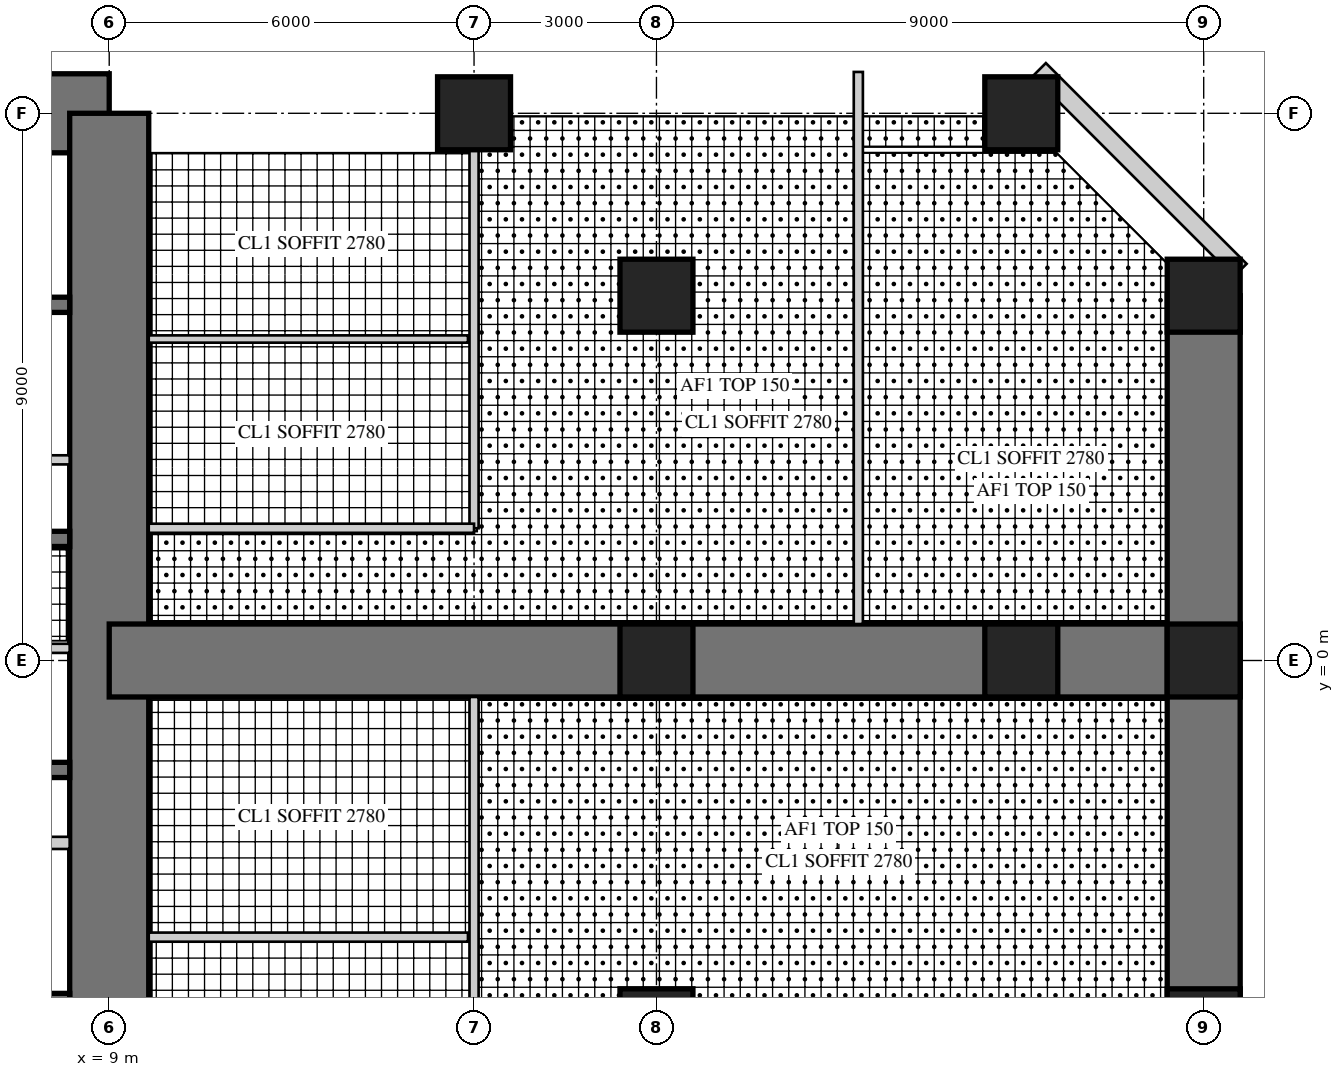
"""IFC4 building model, lengths in metres.
Left out: names, types, materials, properties, quantities, classifications, styles, units other than length and angle.
Written with IfcOpenShell. Run it as: python <this file> out.ifc"""

import sys

from ifc_helpers import new_model, si_unit, direction, frame, frame_2d, origin, origin_2d, place, context, subcontext, project, spatial, rectangle, hollow_rectangle, extrude, element, fill, save


model = new_model("IFC4")
c1 = context("Model", 3, precision=1e-05, world=origin(), true_north=direction((0.0, 1.0)))
c2 = subcontext(c1, "Body", "Model", "MODEL_VIEW")
j1 = project(units=[si_unit("LENGTHUNIT", "METRE"), si_unit("PLANEANGLEUNIT", "RADIAN")], contexts=[c1])
p1 = place(None, origin())
s1 = spatial("IfcSite", under=j1, at=p1, CompositionType="ELEMENT")
p2 = place(p1, origin())
s2 = spatial("IfcBuilding", under=s1, at=p2, CompositionType="ELEMENT")
p3 = place(p2, frame((0.0, 0.0, 79.5)))
s3 = spatial("IfcBuildingStorey", under=s2, at=p3, CompositionType="ELEMENT", Elevation=79.5)
p4 = place(p3, frame((9.0, 9.0, 0.0), z_axis=(0.0, 0.0, 1.0), x_axis=(-1.0, 0.0, 0.0)))
e1 = element("IfcWall", 1, at=p4, inside=s3, PredefinedType="SHEAR", context=c2, shape_type="SweptSolid", body=[
    extrude(rectangle(XDim=18.0, YDim=1.3, at=frame_2d((9.0, 0.0))), origin(), (0.0, 0.0, 1.0), 4.0),
])
p5 = place(p4, frame((9.8, 0.0, 0.0)))
e2 = element("IfcOpeningElement", 2, at=p5, cuts=e1, PredefinedType="OPENING", context=c2, shape_type="SweptSolid", body=[
    extrude(rectangle(XDim=1.0, YDim=2.4, at=frame_2d((0.5, 1.2))), frame((0.0, 0.66, 0.0), z_axis=(0.0, -1.0, 0.0), x_axis=(1.0, 0.0, 0.0)), (0.0, 0.0, 1.0), 1.32),
])
p6 = place(p3, frame((9.0, -9.0, 0.0), z_axis=(0.0, 0.0, 1.0), x_axis=(0.0, 1.0, 0.0)))
e3 = element("IfcWall", 3, at=p6, inside=s3, PredefinedType="SHEAR", context=c2, shape_type="SweptSolid", body=[
    extrude(rectangle(XDim=18.0, YDim=1.3, at=frame_2d((9.0, 0.0))), origin(), (0.0, 0.0, 1.0), 4.0),
])
p7 = place(p6, frame((9.8, 0.0, 0.0)))
e4 = element("IfcOpeningElement", 4, at=p7, cuts=e3, PredefinedType="OPENING", context=c2, shape_type="SweptSolid", body=[
    extrude(rectangle(XDim=1.0, YDim=2.4, at=frame_2d((0.5, 1.2))), frame((0.0, 0.66, 0.0), z_axis=(0.0, -1.0, 0.0), x_axis=(1.0, 0.0, 0.0)), (0.0, 0.0, 1.0), 1.32),
])
p8 = place(p3, frame((1.925, 2.0, 0.0), z_axis=(0.0, 0.0, 1.0), x_axis=(1.0, 0.0, 0.0)))
e5 = element("IfcWall", 5, at=p8, inside=s3, PredefinedType="SHEAR", context=c2, shape_type="SweptSolid", body=[
    extrude(rectangle(XDim=6.425, YDim=0.25, at=frame_2d((3.212, 0.0))), origin(), (0.0, 0.0, 1.0), 4.0),
])
p9 = place(p3, frame((1.925, 5.85, 0.0), z_axis=(0.0, 0.0, 1.0), x_axis=(1.0, 0.0, 0.0)))
e6 = element("IfcWall", 6, at=p9, inside=s3, PredefinedType="SHEAR", context=c2, shape_type="SweptSolid", body=[
    extrude(rectangle(XDim=6.425, YDim=0.25, at=frame_2d((3.212, 0.0))), origin(), (0.0, 0.0, 1.0), 4.0),
])
p10 = place(p9, frame((0.454, 0.0, 0.0)))
e7 = element("IfcOpeningElement", 7, at=p10, cuts=e6, PredefinedType="OPENING", context=c2, shape_type="SweptSolid", body=[
    extrude(rectangle(XDim=1.1, YDim=2.2, at=frame_2d((0.55, 1.1))), frame((0.0, 0.135, 0.0), z_axis=(0.0, -1.0, 0.0), x_axis=(1.0, 0.0, 0.0)), (0.0, 0.0, 1.0), 0.27),
])
p11 = place(p9, frame((2.663, 0.0, 0.0)))
e8 = element("IfcOpeningElement", 8, at=p11, cuts=e6, PredefinedType="OPENING", context=c2, shape_type="SweptSolid", body=[
    extrude(rectangle(XDim=1.1, YDim=2.2, at=frame_2d((0.55, 1.1))), frame((0.0, 0.135, 0.0), z_axis=(0.0, -1.0, 0.0), x_axis=(1.0, 0.0, 0.0)), (0.0, 0.0, 1.0), 0.27),
])
p12 = place(p9, frame((4.871, 0.0, 0.0)))
e9 = element("IfcOpeningElement", 9, at=p12, cuts=e6, PredefinedType="OPENING", context=c2, shape_type="SweptSolid", body=[
    extrude(rectangle(XDim=1.1, YDim=2.2, at=frame_2d((0.55, 1.1))), frame((0.0, 0.135, 0.0), z_axis=(0.0, -1.0, 0.0), x_axis=(1.0, 0.0, 0.0)), (0.0, 0.0, 1.0), 0.27),
])
p13 = place(p3, frame((1.925, 3.3, 0.0), z_axis=(0.0, 0.0, 1.0), x_axis=(1.0, 0.0, 0.0)))
e10 = element("IfcWall", 10, at=p13, inside=s3, PredefinedType="PARTITIONING", context=c2, shape_type="SweptSolid", body=[
    extrude(rectangle(XDim=6.425, YDim=0.15, at=frame_2d((3.212, 0.0))), origin(), (0.0, 0.0, 1.0), 4.0),
])
p14 = place(p13, frame((0.075, 0.0, 0.0)))
e11 = element("IfcOpeningElement", 11, at=p14, cuts=e10, PredefinedType="OPENING", context=c2, shape_type="SweptSolid", body=[
    extrude(rectangle(XDim=0.8, YDim=2.1, at=frame_2d((0.4, 1.05))), frame((0.0, 0.085, 0.0), z_axis=(0.0, -1.0, 0.0), x_axis=(1.0, 0.0, 0.0)), (0.0, 0.0, 1.0), 0.17),
])
p15 = place(p13, frame((3.675, 0.0, 0.0)))
e12 = element("IfcOpeningElement", 12, at=p15, cuts=e10, PredefinedType="OPENING", context=c2, shape_type="SweptSolid", body=[
    extrude(rectangle(XDim=0.8, YDim=2.1, at=frame_2d((0.4, 1.05))), frame((0.0, 0.085, 0.0), z_axis=(0.0, -1.0, 0.0), x_axis=(1.0, 0.0, 0.0)), (0.0, 0.0, 1.0), 0.17),
])
p16 = place(p3, frame((2.125, -1.8, 0.0), z_axis=(0.0, 0.0, 1.0), x_axis=(1.0, 0.0, 0.0)))
e13 = element("IfcWall", 13, at=p16, inside=s3, PredefinedType="SHEAR", context=c2, shape_type="SweptSolid", body=[
    extrude(rectangle(XDim=6.225, YDim=0.25, at=frame_2d((3.113, 0.0))), origin(), (0.0, 0.0, 1.0), 4.0),
])
p17 = place(p3, frame((2.125, -5.6, 0.0), z_axis=(0.0, 0.0, 1.0), x_axis=(1.0, 0.0, 0.0)))
e14 = element("IfcWall", 14, at=p17, inside=s3, PredefinedType="SHEAR", context=c2, shape_type="SweptSolid", body=[
    extrude(rectangle(XDim=6.225, YDim=0.25, at=frame_2d((3.113, 0.0))), origin(), (0.0, 0.0, 1.0), 4.0),
])
p18 = place(p17, frame((0.175, 0.0, 0.0)))
e15 = element("IfcOpeningElement", 15, at=p18, cuts=e14, PredefinedType="OPENING", context=c2, shape_type="SweptSolid", body=[
    extrude(rectangle(XDim=1.0, YDim=2.1, at=frame_2d((0.5, 1.05))), frame((0.0, 0.135, 0.0), z_axis=(0.0, -1.0, 0.0), x_axis=(1.0, 0.0, 0.0)), (0.0, 0.0, 1.0), 0.27),
])
p19 = place(p3, frame((5.725, -3.0, 0.0), z_axis=(0.0, 0.0, 1.0), x_axis=(1.0, 0.0, 0.0)))
e16 = element("IfcWall", 16, at=p19, inside=s3, PredefinedType="PARTITIONING", context=c2, shape_type="SweptSolid", body=[
    extrude(rectangle(XDim=2.625, YDim=0.2, at=frame_2d((1.312, 0.0))), origin(), (0.0, 0.0, 1.0), 4.0),
])
p20 = place(p3, frame((9.0, 0.0, 0.0), z_axis=(0.0, 0.0, 1.0), x_axis=(1.0, 0.0, 0.0)))
e17 = element("IfcWall", 17, at=p20, inside=s3, PredefinedType="SHEAR", context=c2, shape_type="SweptSolid", body=[
    extrude(rectangle(XDim=18.0, YDim=1.2, at=frame_2d((9.0, 0.0))), origin(), (0.0, 0.0, 1.0), 4.0),
])
p21 = place(p20, frame((9.9, 0.0, 0.0)))
e18 = element("IfcOpeningElement", 18, at=p21, cuts=e17, PredefinedType="OPENING", context=c2, shape_type="SweptSolid", body=[
    extrude(rectangle(XDim=1.0, YDim=2.2, at=frame_2d((0.5, 1.1))), frame((0.0, 0.61, 0.0), z_axis=(0.0, -1.0, 0.0), x_axis=(1.0, 0.0, 0.0)), (0.0, 0.0, 1.0), 1.22),
])
p22 = place(p3, frame((27.0, -6.0, 0.0), z_axis=(0.0, 0.0, 1.0), x_axis=(0.0, 1.0, 0.0)))
e19 = element("IfcWall", 19, at=p22, inside=s3, PredefinedType="SHEAR", context=c2, shape_type="SweptSolid", body=[
    extrude(rectangle(XDim=12.0, YDim=1.2, at=frame_2d((6.0, 0.0))), origin(), (0.0, 0.0, 1.0), 4.0),
])
p23 = place(p22, frame((1.6, 0.0, 0.6)))
e20 = element("IfcOpeningElement", 20, at=p23, cuts=e19, PredefinedType="OPENING", context=c2, shape_type="SweptSolid", body=[
    extrude(rectangle(XDim=3.0, YDim=2.4, at=frame_2d((1.5, 1.2))), frame((0.0, 0.61, 0.0), z_axis=(0.0, -1.0, 0.0), x_axis=(1.0, 0.0, 0.0)), (0.0, 0.0, 1.0), 1.22),
])
p24 = place(p22, frame((7.4, 0.0, 0.6)))
e21 = element("IfcOpeningElement", 21, at=p24, cuts=e19, PredefinedType="OPENING", context=c2, shape_type="SweptSolid", body=[
    extrude(rectangle(XDim=3.0, YDim=2.4, at=frame_2d((1.5, 1.2))), frame((0.0, 0.61, 0.0), z_axis=(0.0, -1.0, 0.0), x_axis=(1.0, 0.0, 0.0)), (0.0, 0.0, 1.0), 1.22),
])
for number, where, z_axis, x_axis in (
    (22, (15.0, 9.0, 0.0), (0.0, 0.0, 1.0), (1.0, 0.0, 0.0)),
    (23, (24.0, 9.0, 0.0), (0.0, 0.0, 1.0), (1.0, 0.0, 0.0)),
    (24, (27.0, -6.0, 0.0), (0.0, 0.0, 1.0), (1.0, 0.0, 0.0)),
    (25, (27.0, 0.0, 0.0), (0.0, 0.0, 1.0), (1.0, 0.0, 0.0)),
    (26, (27.0, 6.0, 0.0), (0.0, 0.0, 1.0), (1.0, 0.0, 0.0)),
    (27, (18.0, -6.0, 0.0), (0.0, 0.0, 1.0), (1.0, 0.0, 0.0)),
    (28, (18.0, 0.0, 0.0), (0.0, 0.0, 1.0), (1.0, 0.0, 0.0)),
    (29, (18.0, 6.0, 0.0), (0.0, 0.0, 1.0), (1.0, 0.0, 0.0)),
    (30, (24.0, 0.0, 0.0), (0.0, 0.0, 1.0), (1.0, 0.0, 0.0)),
):
    element("IfcColumn", number, at=place(p3, frame(where, z_axis=z_axis, x_axis=x_axis)), inside=s3, PredefinedType="COLUMN", context=c2, shape_type="SweptSolid", body=[
        extrude(rectangle(XDim=1.2, YDim=1.2, at=origin_2d()), origin(), (0.0, 0.0, 1.0), 4.0),
    ])
p25 = place(p3, frame((27.6, 6.418, 0.0), z_axis=(0.0, 0.0, 1.0), x_axis=(-0.707106781187, 0.707106781187, 0.0)))
e31 = element("IfcWall", 31, at=p25, inside=s3, PredefinedType="SOLIDWALL", context=c2, shape_type="SweptSolid", body=[
    extrude(rectangle(XDim=4.669, YDim=0.3, at=frame_2d((2.335, 0.0))), origin(), (0.0, 0.0, 1.0), 3.8),
])
p26 = place(p25, frame((1.885, 0.0, 0.3)))
e32 = element("IfcOpeningElement", 32, at=p26, cuts=e31, PredefinedType="OPENING", context=c2, shape_type="SweptSolid", body=[
    extrude(rectangle(XDim=0.9, YDim=2.4, at=frame_2d((0.45, 1.2))), frame((0.0, 0.16, 0.0), z_axis=(0.0, -1.0, 0.0), x_axis=(1.0, 0.0, 0.0)), (0.0, 0.0, 1.0), 0.32),
])
p27 = place(p3, frame((2.325, 0.2, 0.0), z_axis=(0.0, 0.0, 1.0), x_axis=(1.0, 0.0, 0.0)))
e33 = element("IfcWall", 33, at=p27, inside=s3, PredefinedType="PARTITIONING", context=c2, shape_type="SweptSolid", body=[
    extrude(rectangle(XDim=6.025, YDim=0.15, at=frame_2d((3.013, 0.0))), origin(), (0.0, 0.0, 1.0), 3.8),
])
p28 = place(p27, frame((0.4, 0.0, 0.0)))
e34 = element("IfcOpeningElement", 34, at=p28, cuts=e33, PredefinedType="OPENING", context=c2, shape_type="SweptSolid", body=[
    extrude(rectangle(XDim=1.0, YDim=2.1, at=frame_2d((0.5, 1.05))), frame((0.0, 0.085, 0.0), z_axis=(0.0, -1.0, 0.0), x_axis=(1.0, 0.0, 0.0)), (0.0, 0.0, 1.0), 0.17),
])
p29 = place(p3, frame((15.0, 2.175, 0.0), z_axis=(0.0, 0.0, 1.0), x_axis=(0.0, 1.0, 0.0)))
e35 = element("IfcWall", 35, at=p29, inside=s3, PredefinedType="PARTITIONING", context=c2, shape_type="SweptSolid", body=[
    extrude(rectangle(XDim=6.225, YDim=0.15, at=frame_2d((3.112, 0.0))), origin(), (0.0, 0.0, 1.0), 2.95),
])
p30 = place(p29, frame((1.056, 0.0, 0.0)))
e36 = element("IfcOpeningElement", 36, at=p30, cuts=e35, PredefinedType="OPENING", context=c2, shape_type="SweptSolid", body=[
    extrude(rectangle(XDim=1.0, YDim=2.1, at=frame_2d((0.5, 1.05))), frame((0.0, 0.085, 0.0), z_axis=(0.0, -1.0, 0.0), x_axis=(1.0, 0.0, 0.0)), (0.0, 0.0, 1.0), 0.17),
])
p31 = place(p29, frame((4.169, 0.0, 0.0)))
e37 = element("IfcOpeningElement", 37, at=p31, cuts=e35, PredefinedType="OPENING", context=c2, shape_type="SweptSolid", body=[
    extrude(rectangle(XDim=1.0, YDim=2.1, at=frame_2d((0.5, 1.05))), frame((0.0, 0.085, 0.0), z_axis=(0.0, -1.0, 0.0), x_axis=(1.0, 0.0, 0.0)), (0.0, 0.0, 1.0), 0.17),
])
p32 = place(p3, frame((9.65, 2.175, 0.0), z_axis=(0.0, 0.0, 1.0), x_axis=(1.0, 0.0, 0.0)))
e38 = element("IfcWall", 38, at=p32, inside=s3, PredefinedType="PARTITIONING", context=c2, shape_type="SweptSolid", body=[
    extrude(rectangle(XDim=5.35, YDim=0.15, at=frame_2d((2.675, 0.0))), origin(), (0.0, 0.0, 1.0), 3.8),
])
p33 = place(p3, frame((9.65, 5.288, 0.0), z_axis=(0.0, 0.0, 1.0), x_axis=(1.0, 0.0, 0.0)))
e39 = element("IfcWall", 39, at=p33, inside=s3, PredefinedType="PLUMBINGWALL", context=c2, shape_type="SweptSolid", body=[
    extrude(rectangle(XDim=5.25, YDim=0.12, at=frame_2d((2.625, 0.0))), origin(), (0.0, 0.0, 1.0), 3.8),
])
p34 = place(p3, frame((15.0, -8.4, 0.0), z_axis=(0.0, 0.0, 1.0), x_axis=(0.0, 1.0, 0.0)))
e40 = element("IfcWall", 40, at=p34, inside=s3, PredefinedType="PARTITIONING", context=c2, shape_type="SweptSolid", body=[
    extrude(rectangle(XDim=7.8, YDim=0.15, at=frame_2d((3.9, 0.0))), origin(), (0.0, 0.0, 1.0), 2.95),
])
p35 = place(p34, frame((1.425, 0.0, 0.0)))
e41 = element("IfcOpeningElement", 41, at=p35, cuts=e40, PredefinedType="OPENING", context=c2, shape_type="SweptSolid", body=[
    extrude(rectangle(XDim=1.0, YDim=2.1, at=frame_2d((0.5, 1.05))), frame((0.0, 0.085, 0.0), z_axis=(0.0, -1.0, 0.0), x_axis=(1.0, 0.0, 0.0)), (0.0, 0.0, 1.0), 0.17),
])
p36 = place(p34, frame((5.325, 0.0, 0.0)))
e42 = element("IfcOpeningElement", 42, at=p36, cuts=e40, PredefinedType="OPENING", context=c2, shape_type="SweptSolid", body=[
    extrude(rectangle(XDim=1.0, YDim=2.1, at=frame_2d((0.5, 1.05))), frame((0.0, 0.085, 0.0), z_axis=(0.0, -1.0, 0.0), x_axis=(1.0, 0.0, 0.0)), (0.0, 0.0, 1.0), 0.17),
])
p37 = place(p3, frame((9.65, -4.55, 0.0), z_axis=(0.0, 0.0, 1.0), x_axis=(1.0, 0.0, 0.0)))
e43 = element("IfcWall", 43, at=p37, inside=s3, PredefinedType="PARTITIONING", context=c2, shape_type="SweptSolid", body=[
    extrude(rectangle(XDim=5.25, YDim=0.15, at=frame_2d((2.625, 0.0))), origin(), (0.0, 0.0, 1.0), 3.8),
])
p38 = place(p3, frame((21.32, 0.6, 0.0), z_axis=(0.0, 0.0, 1.0), x_axis=(0.0, 1.0, 0.0)))
e44 = element("IfcWall", 44, at=p38, inside=s3, PredefinedType="PARTITIONING", context=c2, shape_type="SweptSolid", body=[
    extrude(rectangle(XDim=9.08, YDim=0.15, at=frame_2d((4.54, 0.0))), origin(), (0.0, 0.0, 1.0), 3.8),
])
p39 = place(p38, frame((0.45, 0.0, 0.0)))
e45 = element("IfcOpeningElement", 45, at=p39, cuts=e44, PredefinedType="OPENING", context=c2, shape_type="SweptSolid", body=[
    extrude(rectangle(XDim=1.0, YDim=2.2, at=frame_2d((0.5, 1.1))), frame((0.0, 0.085, 0.0), z_axis=(0.0, -1.0, 0.0), x_axis=(1.0, 0.0, 0.0)), (0.0, 0.0, 1.0), 0.17),
])
p40 = place(p23, origin())
e46 = element("IfcWindow", 46, at=p40, inside=s3, PartitioningType="SINGLE_PANEL", PredefinedType="WINDOW", context=c2, shape_type="SweptSolid", body=[
    extrude(hollow_rectangle(XDim=3.0, YDim=2.4, WallThickness=0.06, at=frame_2d((1.5, 1.2))), frame((0.0, 0.03, 0.0), z_axis=(0.0, -1.0, 0.0), x_axis=(1.0, 0.0, 0.0)), (0.0, 0.0, 1.0), 0.06),
    extrude(rectangle(XDim=2.879, YDim=2.279, at=frame_2d((1.5, 1.2))), frame((0.0, 0.03, 0.0), z_axis=(0.0, -1.0, 0.0), x_axis=(1.0, 0.0, 0.0)), (0.0, 0.0, 1.0), 0.06),
])
fill(e20, e46)
p41 = place(p24, origin())
e47 = element("IfcWindow", 47, at=p41, inside=s3, PartitioningType="SINGLE_PANEL", PredefinedType="WINDOW", context=c2, shape_type="SweptSolid", body=[
    extrude(hollow_rectangle(XDim=3.0, YDim=2.4, WallThickness=0.06, at=frame_2d((1.5, 1.2))), frame((0.0, 0.03, 0.0), z_axis=(0.0, -1.0, 0.0), x_axis=(1.0, 0.0, 0.0)), (0.0, 0.0, 1.0), 0.06),
    extrude(rectangle(XDim=2.879, YDim=2.279, at=frame_2d((1.5, 1.2))), frame((0.0, 0.03, 0.0), z_axis=(0.0, -1.0, 0.0), x_axis=(1.0, 0.0, 0.0)), (0.0, 0.0, 1.0), 0.06),
])
fill(e21, e47)
p42 = place(p26, origin())
e48 = element("IfcWindow", 48, at=p42, inside=s3, PartitioningType="SINGLE_PANEL", PredefinedType="WINDOW", context=c2, shape_type="SweptSolid", body=[
    extrude(hollow_rectangle(XDim=0.9, YDim=2.4, WallThickness=0.06, at=frame_2d((0.45, 1.2))), frame((0.0, 0.03, 0.0), z_axis=(0.0, -1.0, 0.0), x_axis=(1.0, 0.0, 0.0)), (0.0, 0.0, 1.0), 0.06),
    extrude(rectangle(XDim=0.779, YDim=2.279, at=frame_2d((0.45, 1.2))), frame((0.0, 0.03, 0.0), z_axis=(0.0, -1.0, 0.0), x_axis=(1.0, 0.0, 0.0)), (0.0, 0.0, 1.0), 0.06),
])
fill(e32, e48)
p43 = place(p30, origin())
e49 = element("IfcDoor", 49, at=p43, inside=s3, OperationType="SINGLE_SWING_LEFT", PredefinedType="DOOR", context=c2, shape_type="SweptSolid", body=[
    extrude(rectangle(XDim=1.0, YDim=2.1, at=frame_2d((0.5, 1.05))), frame((0.0, 0.025, 0.0), z_axis=(0.0, -1.0, 0.0), x_axis=(1.0, 0.0, 0.0)), (0.0, 0.0, 1.0), 0.05),
])
fill(e36, e49)
p44 = place(p31, origin())
e50 = element("IfcDoor", 50, at=p44, inside=s3, OperationType="SINGLE_SWING_LEFT", PredefinedType="DOOR", context=c2, shape_type="SweptSolid", body=[
    extrude(rectangle(XDim=1.0, YDim=2.1, at=frame_2d((0.5, 1.05))), frame((0.0, 0.025, 0.0), z_axis=(0.0, -1.0, 0.0), x_axis=(1.0, 0.0, 0.0)), (0.0, 0.0, 1.0), 0.05),
])
fill(e37, e50)
p45 = place(p36, origin())
e51 = element("IfcDoor", 51, at=p45, inside=s3, OperationType="SINGLE_SWING_LEFT", PredefinedType="DOOR", context=c2, shape_type="SweptSolid", body=[
    extrude(rectangle(XDim=1.0, YDim=2.1, at=frame_2d((0.5, 1.05))), frame((0.0, 0.025, 0.0), z_axis=(0.0, -1.0, 0.0), x_axis=(1.0, 0.0, 0.0)), (0.0, 0.0, 1.0), 0.05),
])
fill(e42, e51)
p46 = place(p39, frame((1.0, 0.0, 0.0), z_axis=(0.0, 0.0, 1.0), x_axis=(-1.0, 0.0, 0.0)))
e52 = element("IfcDoor", 52, at=p46, inside=s3, OperationType="SINGLE_SWING_RIGHT", PredefinedType="DOOR", context=c2, shape_type="SweptSolid", body=[
    extrude(rectangle(XDim=1.0, YDim=2.2, at=frame_2d((0.5, 1.1))), frame((0.0, 0.025, 0.0), z_axis=(0.0, -1.0, 0.0), x_axis=(1.0, 0.0, 0.0)), (0.0, 0.0, 1.0), 0.05),
])
fill(e45, e52)
p47 = place(p21, origin())
e53 = element("IfcDoor", 53, at=p47, inside=s3, OperationType="SINGLE_SWING_RIGHT", PredefinedType="DOOR", context=c2, shape_type="SweptSolid", body=[
    extrude(rectangle(XDim=1.0, YDim=2.2, at=frame_2d((0.5, 1.1))), frame((0.0, 0.025, 0.0), z_axis=(0.0, -1.0, 0.0), x_axis=(1.0, 0.0, 0.0)), (0.0, 0.0, 1.0), 0.05),
])
fill(e18, e53)
p48 = place(p7, frame((1.0, 0.0, 0.0), z_axis=(0.0, 0.0, 1.0), x_axis=(-1.0, 0.0, 0.0)))
e54 = element("IfcDoor", 54, at=p48, inside=s3, OperationType="SINGLE_SWING_RIGHT", PredefinedType="DOOR", context=c2, shape_type="SweptSolid", body=[
    extrude(rectangle(XDim=1.0, YDim=2.4, at=frame_2d((0.5, 1.2))), frame((0.0, -0.005, 0.0), z_axis=(0.0, -1.0, 0.0), x_axis=(1.0, 0.0, 0.0)), (0.0, 0.0, 1.0), 0.05),
])
fill(e4, e54)
save(model, sys.argv[1])
